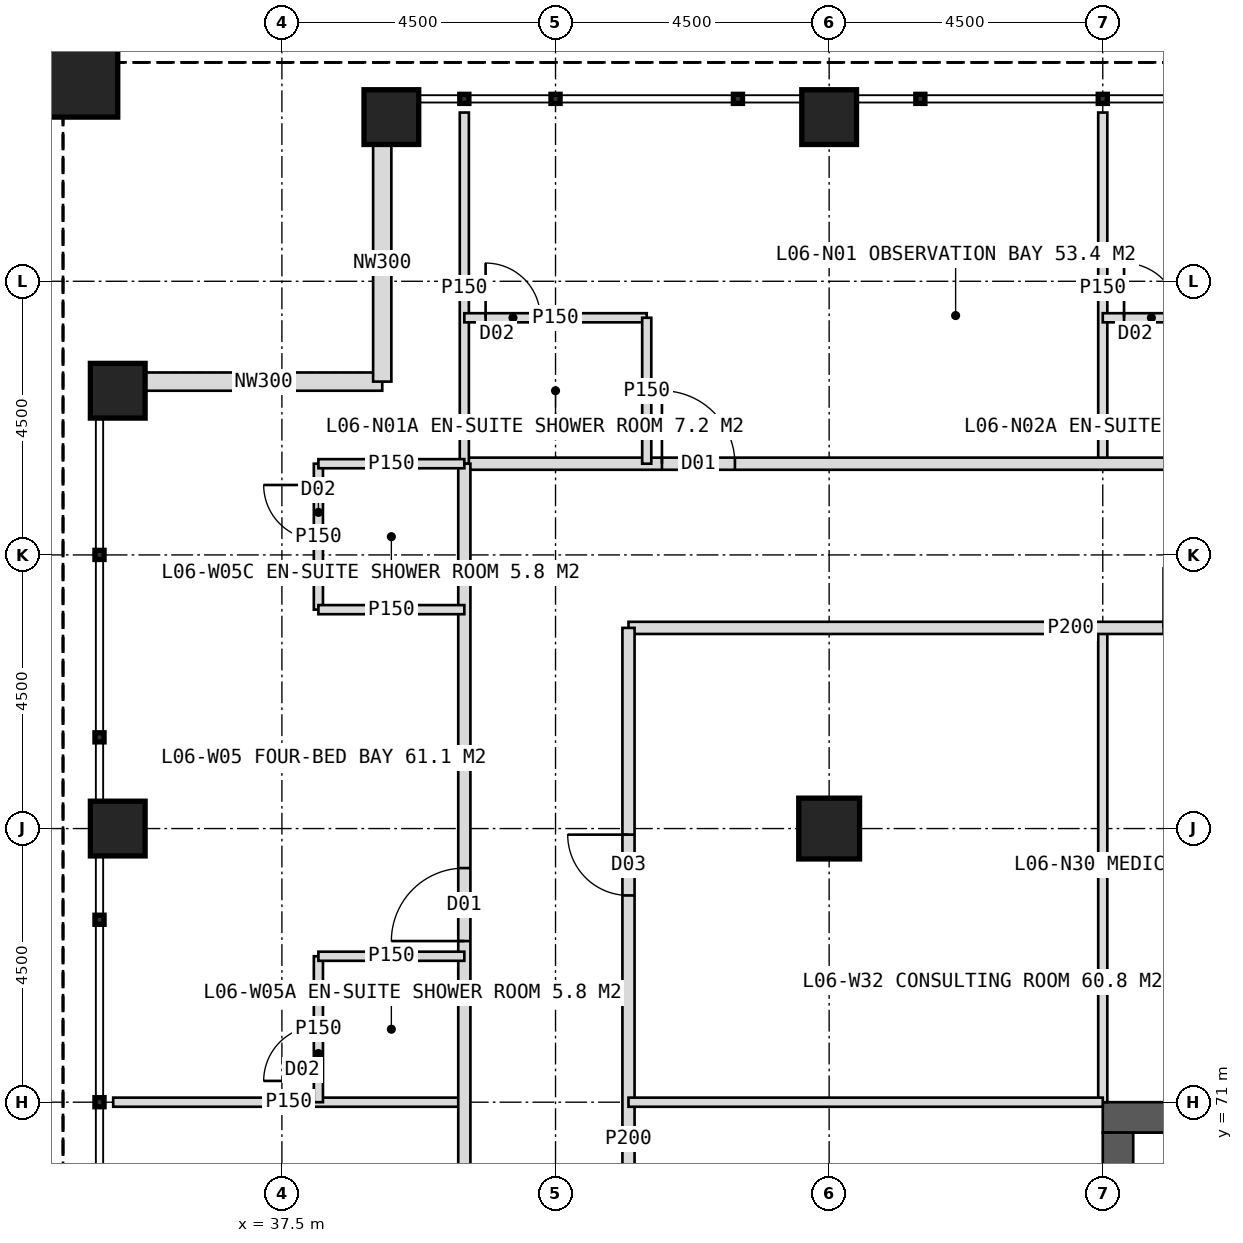
"""IFC4 building model, lengths in metres.
Left out: names, types, materials, properties, quantities, classifications, styles, units other than length and angle.
Written with IfcOpenShell. Run it as: python <this file> out.ifc"""

import sys

from ifc_helpers import new_model, si_unit, direction, frame, frame_2d, origin, origin_2d, place, context, subcontext, project, spatial, rectangle, hollow_rectangle, extrude, element, fill, save


model = new_model("IFC4")
c1 = context("Model", 3, precision=1e-05, world=origin(), true_north=direction((0.0, 1.0)))
c2 = subcontext(c1, "Body", "Model", "MODEL_VIEW")
j1 = project(units=[si_unit("LENGTHUNIT", "METRE"), si_unit("PLANEANGLEUNIT", "RADIAN")], contexts=[c1])
p1 = place(None, origin())
s1 = spatial("IfcSite", under=j1, at=p1, CompositionType="ELEMENT")
p2 = place(p1, origin())
s2 = spatial("IfcBuilding", under=s1, at=p2, CompositionType="ELEMENT")
p3 = place(p2, frame((0.0, 0.0, 31.0)))
s3 = spatial("IfcBuildingStorey", under=s2, at=p3, CompositionType="ELEMENT", Elevation=31.0)
p4 = place(p3, frame((51.0, 70.75, 0.0), z_axis=(0.0, 0.0, 1.0), x_axis=(1.0, 0.0, 0.0)))
e1 = element("IfcWall", 1, at=p4, inside=s3, PredefinedType="SHEAR", context=c2, shape_type="SweptSolid", body=[
    extrude(rectangle(XDim=18.0, YDim=0.5, at=frame_2d((9.0, 0.0))), origin(), (0.0, 0.0, 1.0), 4.0),
])
p5 = place(p4, frame((8.1, 0.0, 0.0)))
e2 = element("IfcOpeningElement", 2, at=p5, cuts=e1, PredefinedType="OPENING", context=c2, shape_type="SweptSolid", body=[
    extrude(rectangle(XDim=1.8, YDim=2.2, at=frame_2d((0.9, 1.1))), frame((0.0, 0.26, 0.0), z_axis=(0.0, -1.0, 0.0), x_axis=(1.0, 0.0, 0.0)), (0.0, 0.0, 1.0), 0.52),
])
p6 = place(p3, frame((51.25, 53.5, 0.0), z_axis=(0.0, 0.0, 1.0), x_axis=(0.0, 1.0, 0.0)))
e3 = element("IfcWall", 3, at=p6, inside=s3, PredefinedType="SHEAR", context=c2, shape_type="SweptSolid", body=[
    extrude(rectangle(XDim=17.0, YDim=0.5, at=frame_2d((8.5, 0.0))), origin(), (0.0, 0.0, 1.0), 4.0),
])
p7 = place(p6, frame((6.0, 0.0, 0.0)))
e4 = element("IfcOpeningElement", 4, at=p7, cuts=e3, PredefinedType="OPENING", context=c2, shape_type="SweptSolid", body=[
    extrude(rectangle(XDim=1.5, YDim=2.2, at=frame_2d((0.75, 1.1))), frame((0.0, 0.26, 0.0), z_axis=(0.0, -1.0, 0.0), x_axis=(1.0, 0.0, 0.0)), (0.0, 0.0, 1.0), 0.52),
])
p8 = place(p3, frame((46.5, 75.5, 0.0), z_axis=(0.0, 0.0, 1.0), x_axis=(1.0, 0.0, 0.0)))
e5 = element("IfcColumn", 5, at=p8, inside=s3, PredefinedType="COLUMN", context=c2, shape_type="SweptSolid", body=[
    extrude(hollow_rectangle(XDim=1.0, YDim=1.0, WallThickness=0.1, at=origin_2d()), origin(), (0.0, 0.0, 1.0), 4.0),
])
for number, where, z_axis, x_axis in (
    (6, (39.3, 87.2, 0.0), (0.0, 0.0, 1.0), (1.0, 0.0, 0.0)),
    (7, (46.5, 87.2, 0.0), (0.0, 0.0, 1.0), (1.0, 0.0, 0.0)),
    (8, (34.8, 75.5, 0.0), (0.0, 0.0, 1.0), (1.0, 0.0, 0.0)),
    (9, (34.8, 82.7, 0.0), (0.0, 0.0, 1.0), (1.0, 0.0, 0.0)),
):
    element("IfcColumn", number, at=place(p3, frame(where, z_axis=z_axis, x_axis=x_axis)), inside=s3, PredefinedType="COLUMN", context=c2, shape_type="SweptSolid", body=[
        extrude(hollow_rectangle(XDim=0.9, YDim=0.9, WallThickness=0.08, at=origin_2d()), origin(), (0.0, 0.0, 1.0), 4.0),
    ])
p9 = place(p3, frame((33.9, 88.1, 0.0), z_axis=(0.0, 0.0, 1.0), x_axis=(1.0, 0.0, 0.0)))
e10 = element("IfcColumn", 10, at=p9, inside=s3, PredefinedType="COLUMN", context=c2, shape_type="SweptSolid", body=[
    extrude(hollow_rectangle(XDim=1.8, YDim=1.8, WallThickness=0.1, at=origin_2d()), origin(), (0.0, 0.0, 1.0), 4.0),
])
for number, where, z_axis, x_axis in (
    (11, (35.25, 82.85, 0.0), (0.0, 0.0, 1.0), (1.0, 0.0, 0.0)),
    (12, (39.15, 82.85, 0.0), (0.0, 0.0, 1.0), (0.0, 1.0, 0.0)),
):
    element("IfcWall", number, at=place(p3, frame(where, z_axis=z_axis, x_axis=x_axis)), inside=s3, PredefinedType="ELEMENTEDWALL", context=c2, shape_type="SweptSolid", body=[
        extrude(rectangle(XDim=3.9, YDim=0.3, at=frame_2d((1.95, 0.0))), origin(), (0.0, 0.0, 1.0), 2.95),
    ])
p10 = place(p3, frame((51.0, 81.5, 0.0), z_axis=(0.0, 0.0, 1.0), x_axis=(0.0, 1.0, 0.0)))
e13 = element("IfcWall", 13, at=p10, inside=s3, PredefinedType="PARTITIONING", context=c2, shape_type="SweptSolid", body=[
    extrude(rectangle(XDim=5.775, YDim=0.15, at=frame_2d((2.887, 0.0))), origin(), (0.0, 0.0, 1.0), 3.75),
])
p11 = place(p3, frame((40.5, 81.5, 0.0), z_axis=(0.0, 0.0, 1.0), x_axis=(1.0, 0.0, 0.0)))
e14 = element("IfcWall", 14, at=p11, inside=s3, PredefinedType="PARTITIONING", context=c2, shape_type="SweptSolid", body=[
    extrude(rectangle(XDim=39.0, YDim=0.2, at=frame_2d((19.5, 0.0))), origin(), (0.0, 0.0, 1.0), 3.75),
])
p12 = place(p11, frame((3.25, 0.0, 0.0)))
e15 = element("IfcOpeningElement", 15, at=p12, cuts=e14, PredefinedType="OPENING", context=c2, shape_type="SweptSolid", body=[
    extrude(rectangle(XDim=1.2, YDim=2.2, at=frame_2d((0.6, 1.1))), frame((0.0, 0.11, 0.0), z_axis=(0.0, -1.0, 0.0), x_axis=(1.0, 0.0, 0.0)), (0.0, 0.0, 1.0), 0.22),
])
p13 = place(p11, frame((13.75, 0.0, 0.0)))
e16 = element("IfcOpeningElement", 16, at=p13, cuts=e14, PredefinedType="OPENING", context=c2, shape_type="SweptSolid", body=[
    extrude(rectangle(XDim=1.2, YDim=2.2, at=frame_2d((0.6, 1.1))), frame((0.0, 0.11, 0.0), z_axis=(0.0, -1.0, 0.0), x_axis=(1.0, 0.0, 0.0)), (0.0, 0.0, 1.0), 0.22),
])
p14 = place(p11, frame((22.75, 0.0, 0.0)))
e17 = element("IfcOpeningElement", 17, at=p14, cuts=e14, PredefinedType="OPENING", context=c2, shape_type="SweptSolid", body=[
    extrude(rectangle(XDim=1.2, YDim=2.2, at=frame_2d((0.6, 1.1))), frame((0.0, 0.11, 0.0), z_axis=(0.0, -1.0, 0.0), x_axis=(1.0, 0.0, 0.0)), (0.0, 0.0, 1.0), 0.22),
])
p15 = place(p11, frame((33.25, 0.0, 0.0)))
e18 = element("IfcOpeningElement", 18, at=p15, cuts=e14, PredefinedType="OPENING", context=c2, shape_type="SweptSolid", body=[
    extrude(rectangle(XDim=1.0, YDim=2.1, at=frame_2d((0.5, 1.05))), frame((0.0, 0.11, 0.0), z_axis=(0.0, -1.0, 0.0), x_axis=(1.0, 0.0, 0.0)), (0.0, 0.0, 1.0), 0.22),
])
p16 = place(p3, frame((40.5, 81.5, 0.0), z_axis=(0.0, 0.0, 1.0), x_axis=(0.0, 1.0, 0.0)))
e19 = element("IfcWall", 19, at=p16, inside=s3, PredefinedType="PARTITIONING", context=c2, shape_type="SweptSolid", body=[
    extrude(rectangle(XDim=5.775, YDim=0.15, at=frame_2d((2.887, 0.0))), origin(), (0.0, 0.0, 1.0), 3.75),
])
p17 = place(p3, frame((40.5, 83.9, 0.0), z_axis=(0.0, 0.0, 1.0), x_axis=(1.0, 0.0, 0.0)))
e20 = element("IfcWall", 20, at=p17, inside=s3, PredefinedType="PARTITIONING", context=c2, shape_type="SweptSolid", body=[
    extrude(rectangle(XDim=3.0, YDim=0.15, at=frame_2d((1.5, 0.0))), origin(), (0.0, 0.0, 1.0), 3.75),
])
p18 = place(p17, frame((0.35, 0.0, 0.0)))
e21 = element("IfcOpeningElement", 21, at=p18, cuts=e20, PredefinedType="OPENING", context=c2, shape_type="SweptSolid", body=[
    extrude(rectangle(XDim=0.9, YDim=2.1, at=frame_2d((0.45, 1.05))), frame((0.0, 0.085, 0.0), z_axis=(0.0, -1.0, 0.0), x_axis=(1.0, 0.0, 0.0)), (0.0, 0.0, 1.0), 0.17),
])
p19 = place(p3, frame((43.5, 81.5, 0.0), z_axis=(0.0, 0.0, 1.0), x_axis=(0.0, 1.0, 0.0)))
e22 = element("IfcWall", 22, at=p19, inside=s3, PredefinedType="PARTITIONING", context=c2, shape_type="SweptSolid", body=[
    extrude(rectangle(XDim=2.4, YDim=0.15, at=frame_2d((1.2, 0.0))), origin(), (0.0, 0.0, 1.0), 3.75),
])
p20 = place(p3, frame((51.0, 83.9, 0.0), z_axis=(0.0, 0.0, 1.0), x_axis=(1.0, 0.0, 0.0)))
e23 = element("IfcWall", 23, at=p20, inside=s3, PredefinedType="PARTITIONING", context=c2, shape_type="SweptSolid", body=[
    extrude(rectangle(XDim=3.0, YDim=0.15, at=frame_2d((1.5, 0.0))), origin(), (0.0, 0.0, 1.0), 3.75),
])
p21 = place(p20, frame((0.35, 0.0, 0.0)))
e24 = element("IfcOpeningElement", 24, at=p21, cuts=e23, PredefinedType="OPENING", context=c2, shape_type="SweptSolid", body=[
    extrude(rectangle(XDim=0.9, YDim=2.1, at=frame_2d((0.45, 1.05))), frame((0.0, 0.085, 0.0), z_axis=(0.0, -1.0, 0.0), x_axis=(1.0, 0.0, 0.0)), (0.0, 0.0, 1.0), 0.17),
])
p22 = place(p3, frame((51.0, 71.0, 0.0), z_axis=(0.0, 0.0, 1.0), x_axis=(0.0, 1.0, 0.0)))
e25 = element("IfcWall", 25, at=p22, inside=s3, PredefinedType="PARTITIONING", context=c2, shape_type="SweptSolid", body=[
    extrude(rectangle(XDim=7.8, YDim=0.15, at=frame_2d((3.9, 0.0))), origin(), (0.0, 0.0, 1.0), 3.75),
])
p23 = place(p3, frame((43.2, 78.8, 0.0), z_axis=(0.0, 0.0, 1.0), x_axis=(1.0, 0.0, 0.0)))
e26 = element("IfcWall", 26, at=p23, inside=s3, PredefinedType="PARTITIONING", context=c2, shape_type="SweptSolid", body=[
    extrude(rectangle(XDim=14.55, YDim=0.2, at=frame_2d((7.275, 0.0))), origin(), (0.0, 0.0, 1.0), 3.75),
])
p24 = place(p23, frame((8.8, 0.0, 0.0)))
e27 = element("IfcOpeningElement", 27, at=p24, cuts=e26, PredefinedType="OPENING", context=c2, shape_type="SweptSolid", body=[
    extrude(rectangle(XDim=1.0, YDim=2.1, at=frame_2d((0.5, 1.05))), frame((0.0, 0.11, 0.0), z_axis=(0.0, -1.0, 0.0), x_axis=(1.0, 0.0, 0.0)), (0.0, 0.0, 1.0), 0.22),
])
p25 = place(p23, frame((12.175, 0.0, 0.0)))
e28 = element("IfcOpeningElement", 28, at=p25, cuts=e26, PredefinedType="OPENING", context=c2, shape_type="SweptSolid", body=[
    extrude(rectangle(XDim=1.0, YDim=2.1, at=frame_2d((0.5, 1.05))), frame((0.0, 0.11, 0.0), z_axis=(0.0, -1.0, 0.0), x_axis=(1.0, 0.0, 0.0)), (0.0, 0.0, 1.0), 0.22),
])
p26 = place(p3, frame((40.5, 71.0, 0.0), z_axis=(0.0, 0.0, 1.0), x_axis=(-1.0, 0.0, 0.0)))
e29 = element("IfcWall", 29, at=p26, inside=s3, PredefinedType="PARTITIONING", context=c2, shape_type="SweptSolid", body=[
    extrude(rectangle(XDim=5.775, YDim=0.15, at=frame_2d((2.887, 0.0))), origin(), (0.0, 0.0, 1.0), 3.75),
])
p27 = place(p3, frame((40.5, 42.5, 0.0), z_axis=(0.0, 0.0, 1.0), x_axis=(0.0, 1.0, 0.0)))
e30 = element("IfcWall", 30, at=p27, inside=s3, PredefinedType="PARTITIONING", context=c2, shape_type="SweptSolid", body=[
    extrude(rectangle(XDim=39.0, YDim=0.2, at=frame_2d((19.5, 0.0))), origin(), (0.0, 0.0, 1.0), 3.75),
])
p28 = place(p27, frame((3.25, 0.0, 0.0)))
e31 = element("IfcOpeningElement", 31, at=p28, cuts=e30, PredefinedType="OPENING", context=c2, shape_type="SweptSolid", body=[
    extrude(rectangle(XDim=1.2, YDim=2.2, at=frame_2d((0.6, 1.1))), frame((0.0, 0.11, 0.0), z_axis=(0.0, -1.0, 0.0), x_axis=(1.0, 0.0, 0.0)), (0.0, 0.0, 1.0), 0.22),
])
p29 = place(p27, frame((10.15, 0.0, 0.0)))
e32 = element("IfcOpeningElement", 32, at=p29, cuts=e30, PredefinedType="OPENING", context=c2, shape_type="SweptSolid", body=[
    extrude(rectangle(XDim=1.2, YDim=2.2, at=frame_2d((0.6, 1.1))), frame((0.0, 0.11, 0.0), z_axis=(0.0, -1.0, 0.0), x_axis=(1.0, 0.0, 0.0)), (0.0, 0.0, 1.0), 0.22),
])
p30 = place(p27, frame((16.15, 0.0, 0.0)))
e33 = element("IfcOpeningElement", 33, at=p30, cuts=e30, PredefinedType="OPENING", context=c2, shape_type="SweptSolid", body=[
    extrude(rectangle(XDim=1.2, YDim=2.2, at=frame_2d((0.6, 1.1))), frame((0.0, 0.11, 0.0), z_axis=(0.0, -1.0, 0.0), x_axis=(1.0, 0.0, 0.0)), (0.0, 0.0, 1.0), 0.22),
])
p31 = place(p27, frame((22.75, 0.0, 0.0)))
e34 = element("IfcOpeningElement", 34, at=p31, cuts=e30, PredefinedType="OPENING", context=c2, shape_type="SweptSolid", body=[
    extrude(rectangle(XDim=1.2, YDim=2.2, at=frame_2d((0.6, 1.1))), frame((0.0, 0.11, 0.0), z_axis=(0.0, -1.0, 0.0), x_axis=(1.0, 0.0, 0.0)), (0.0, 0.0, 1.0), 0.22),
])
p32 = place(p27, frame((31.15, 0.0, 0.0)))
e35 = element("IfcOpeningElement", 35, at=p32, cuts=e30, PredefinedType="OPENING", context=c2, shape_type="SweptSolid", body=[
    extrude(rectangle(XDim=1.2, YDim=2.2, at=frame_2d((0.6, 1.1))), frame((0.0, 0.11, 0.0), z_axis=(0.0, -1.0, 0.0), x_axis=(1.0, 0.0, 0.0)), (0.0, 0.0, 1.0), 0.22),
])
p33 = place(p3, frame((38.1, 71.0, 0.0), z_axis=(0.0, 0.0, 1.0), x_axis=(0.0, 1.0, 0.0)))
e36 = element("IfcWall", 36, at=p33, inside=s3, PredefinedType="PARTITIONING", context=c2, shape_type="SweptSolid", body=[
    extrude(rectangle(XDim=2.4, YDim=0.15, at=frame_2d((1.2, 0.0))), origin(), (0.0, 0.0, 1.0), 3.75),
])
p34 = place(p33, frame((0.35, 0.0, 0.0)))
e37 = element("IfcOpeningElement", 37, at=p34, cuts=e36, PredefinedType="OPENING", context=c2, shape_type="SweptSolid", body=[
    extrude(rectangle(XDim=0.9, YDim=2.1, at=frame_2d((0.45, 1.05))), frame((0.0, 0.085, 0.0), z_axis=(0.0, -1.0, 0.0), x_axis=(1.0, 0.0, 0.0)), (0.0, 0.0, 1.0), 0.17),
])
p35 = place(p3, frame((40.5, 73.4, 0.0), z_axis=(0.0, 0.0, 1.0), x_axis=(-1.0, 0.0, 0.0)))
e38 = element("IfcWall", 38, at=p35, inside=s3, PredefinedType="PARTITIONING", context=c2, shape_type="SweptSolid", body=[
    extrude(rectangle(XDim=2.4, YDim=0.15, at=frame_2d((1.2, 0.0))), origin(), (0.0, 0.0, 1.0), 3.75),
])
p36 = place(p3, frame((38.1, 79.1, 0.0), z_axis=(0.0, 0.0, 1.0), x_axis=(0.0, 1.0, 0.0)))
e39 = element("IfcWall", 39, at=p36, inside=s3, PredefinedType="PARTITIONING", context=c2, shape_type="SweptSolid", body=[
    extrude(rectangle(XDim=2.4, YDim=0.15, at=frame_2d((1.2, 0.0))), origin(), (0.0, 0.0, 1.0), 3.75),
])
p37 = place(p36, frame((1.15, 0.0, 0.0)))
e40 = element("IfcOpeningElement", 40, at=p37, cuts=e39, PredefinedType="OPENING", context=c2, shape_type="SweptSolid", body=[
    extrude(rectangle(XDim=0.9, YDim=2.1, at=frame_2d((0.45, 1.05))), frame((0.0, 0.085, 0.0), z_axis=(0.0, -1.0, 0.0), x_axis=(1.0, 0.0, 0.0)), (0.0, 0.0, 1.0), 0.17),
])
for number, where, z_axis, x_axis in (
    (41, (40.5, 79.1, 0.0), (0.0, 0.0, 1.0), (-1.0, 0.0, 0.0)),
    (42, (40.5, 81.5, 0.0), (0.0, 0.0, 1.0), (-1.0, 0.0, 0.0)),
):
    element("IfcWall", number, at=place(p3, frame(where, z_axis=z_axis, x_axis=x_axis)), inside=s3, PredefinedType="PARTITIONING", context=c2, shape_type="SweptSolid", body=[
        extrude(rectangle(XDim=2.4, YDim=0.15, at=frame_2d((1.2, 0.0))), origin(), (0.0, 0.0, 1.0), 3.75),
    ])
p38 = place(p3, frame((43.2, 62.0, 0.0), z_axis=(0.0, 0.0, 1.0), x_axis=(0.0, 1.0, 0.0)))
e43 = element("IfcWall", 43, at=p38, inside=s3, PredefinedType="PARTITIONING", context=c2, shape_type="SweptSolid", body=[
    extrude(rectangle(XDim=16.8, YDim=0.2, at=frame_2d((8.4, 0.0))), origin(), (0.0, 0.0, 1.0), 3.75),
])
p39 = place(p38, frame((4.0, 0.0, 0.0)))
e44 = element("IfcOpeningElement", 44, at=p39, cuts=e43, PredefinedType="OPENING", context=c2, shape_type="SweptSolid", body=[
    extrude(rectangle(XDim=1.0, YDim=2.1, at=frame_2d((0.5, 1.05))), frame((0.0, 0.11, 0.0), z_axis=(0.0, -1.0, 0.0), x_axis=(1.0, 0.0, 0.0)), (0.0, 0.0, 1.0), 0.22),
])
p40 = place(p38, frame((12.4, 0.0, 0.0)))
e45 = element("IfcOpeningElement", 45, at=p40, cuts=e43, PredefinedType="OPENING", context=c2, shape_type="SweptSolid", body=[
    extrude(rectangle(XDim=1.0, YDim=2.1, at=frame_2d((0.5, 1.05))), frame((0.0, 0.11, 0.0), z_axis=(0.0, -1.0, 0.0), x_axis=(1.0, 0.0, 0.0)), (0.0, 0.0, 1.0), 0.22),
])
p41 = place(p3, frame((51.0, 71.0, 0.0), z_axis=(0.0, 0.0, 1.0), x_axis=(-1.0, 0.0, 0.0)))
e46 = element("IfcWall", 46, at=p41, inside=s3, PredefinedType="PARTITIONING", context=c2, shape_type="SweptSolid", body=[
    extrude(rectangle(XDim=7.8, YDim=0.15, at=frame_2d((3.9, 0.0))), origin(), (0.0, 0.0, 1.0), 3.75),
])
p42 = place(p12, origin())
e47 = element("IfcDoor", 47, at=p42, inside=s3, OperationType="SINGLE_SWING_LEFT", PredefinedType="DOOR", context=c2, shape_type="SweptSolid", body=[
    extrude(rectangle(XDim=1.2, YDim=2.2, at=frame_2d((0.6, 1.1))), frame((0.0, 0.025, 0.0), z_axis=(0.0, -1.0, 0.0), x_axis=(1.0, 0.0, 0.0)), (0.0, 0.0, 1.0), 0.05),
])
fill(e15, e47)
p43 = place(p18, origin())
e48 = element("IfcDoor", 48, at=p43, inside=s3, OperationType="SINGLE_SWING_LEFT", PredefinedType="DOOR", context=c2, shape_type="SweptSolid", body=[
    extrude(rectangle(XDim=0.9, YDim=2.1, at=frame_2d((0.45, 1.05))), frame((0.0, 0.025, 0.0), z_axis=(0.0, -1.0, 0.0), x_axis=(1.0, 0.0, 0.0)), (0.0, 0.0, 1.0), 0.05),
])
fill(e21, e48)
p44 = place(p21, origin())
e49 = element("IfcDoor", 49, at=p44, inside=s3, OperationType="SINGLE_SWING_LEFT", PredefinedType="DOOR", context=c2, shape_type="SweptSolid", body=[
    extrude(rectangle(XDim=0.9, YDim=2.1, at=frame_2d((0.45, 1.05))), frame((0.0, 0.025, 0.0), z_axis=(0.0, -1.0, 0.0), x_axis=(1.0, 0.0, 0.0)), (0.0, 0.0, 1.0), 0.05),
])
fill(e24, e49)
p45 = place(p32, origin())
e50 = element("IfcDoor", 50, at=p45, inside=s3, OperationType="SINGLE_SWING_LEFT", PredefinedType="DOOR", context=c2, shape_type="SweptSolid", body=[
    extrude(rectangle(XDim=1.2, YDim=2.2, at=frame_2d((0.6, 1.1))), frame((0.0, 0.025, 0.0), z_axis=(0.0, -1.0, 0.0), x_axis=(1.0, 0.0, 0.0)), (0.0, 0.0, 1.0), 0.05),
])
fill(e35, e50)
p46 = place(p34, origin())
e51 = element("IfcDoor", 51, at=p46, inside=s3, OperationType="SINGLE_SWING_LEFT", PredefinedType="DOOR", context=c2, shape_type="SweptSolid", body=[
    extrude(rectangle(XDim=0.9, YDim=2.1, at=frame_2d((0.45, 1.05))), frame((0.0, 0.025, 0.0), z_axis=(0.0, -1.0, 0.0), x_axis=(1.0, 0.0, 0.0)), (0.0, 0.0, 1.0), 0.05),
])
fill(e37, e51)
p47 = place(p37, origin())
e52 = element("IfcDoor", 52, at=p47, inside=s3, OperationType="SINGLE_SWING_RIGHT", PredefinedType="DOOR", context=c2, shape_type="SweptSolid", body=[
    extrude(rectangle(XDim=0.9, YDim=2.1, at=frame_2d((0.45, 1.05))), frame((0.0, 0.025, 0.0), z_axis=(0.0, -1.0, 0.0), x_axis=(1.0, 0.0, 0.0)), (0.0, 0.0, 1.0), 0.05),
])
fill(e40, e52)
p48 = place(p40, origin())
e53 = element("IfcDoor", 53, at=p48, inside=s3, OperationType="SINGLE_SWING_RIGHT", PredefinedType="DOOR", context=c2, shape_type="SweptSolid", body=[
    extrude(rectangle(XDim=1.0, YDim=2.1, at=frame_2d((0.5, 1.05))), frame((0.0, 0.025, 0.0), z_axis=(0.0, -1.0, 0.0), x_axis=(1.0, 0.0, 0.0)), (0.0, 0.0, 1.0), 0.05),
])
fill(e45, e53)
save(model, sys.argv[1])
